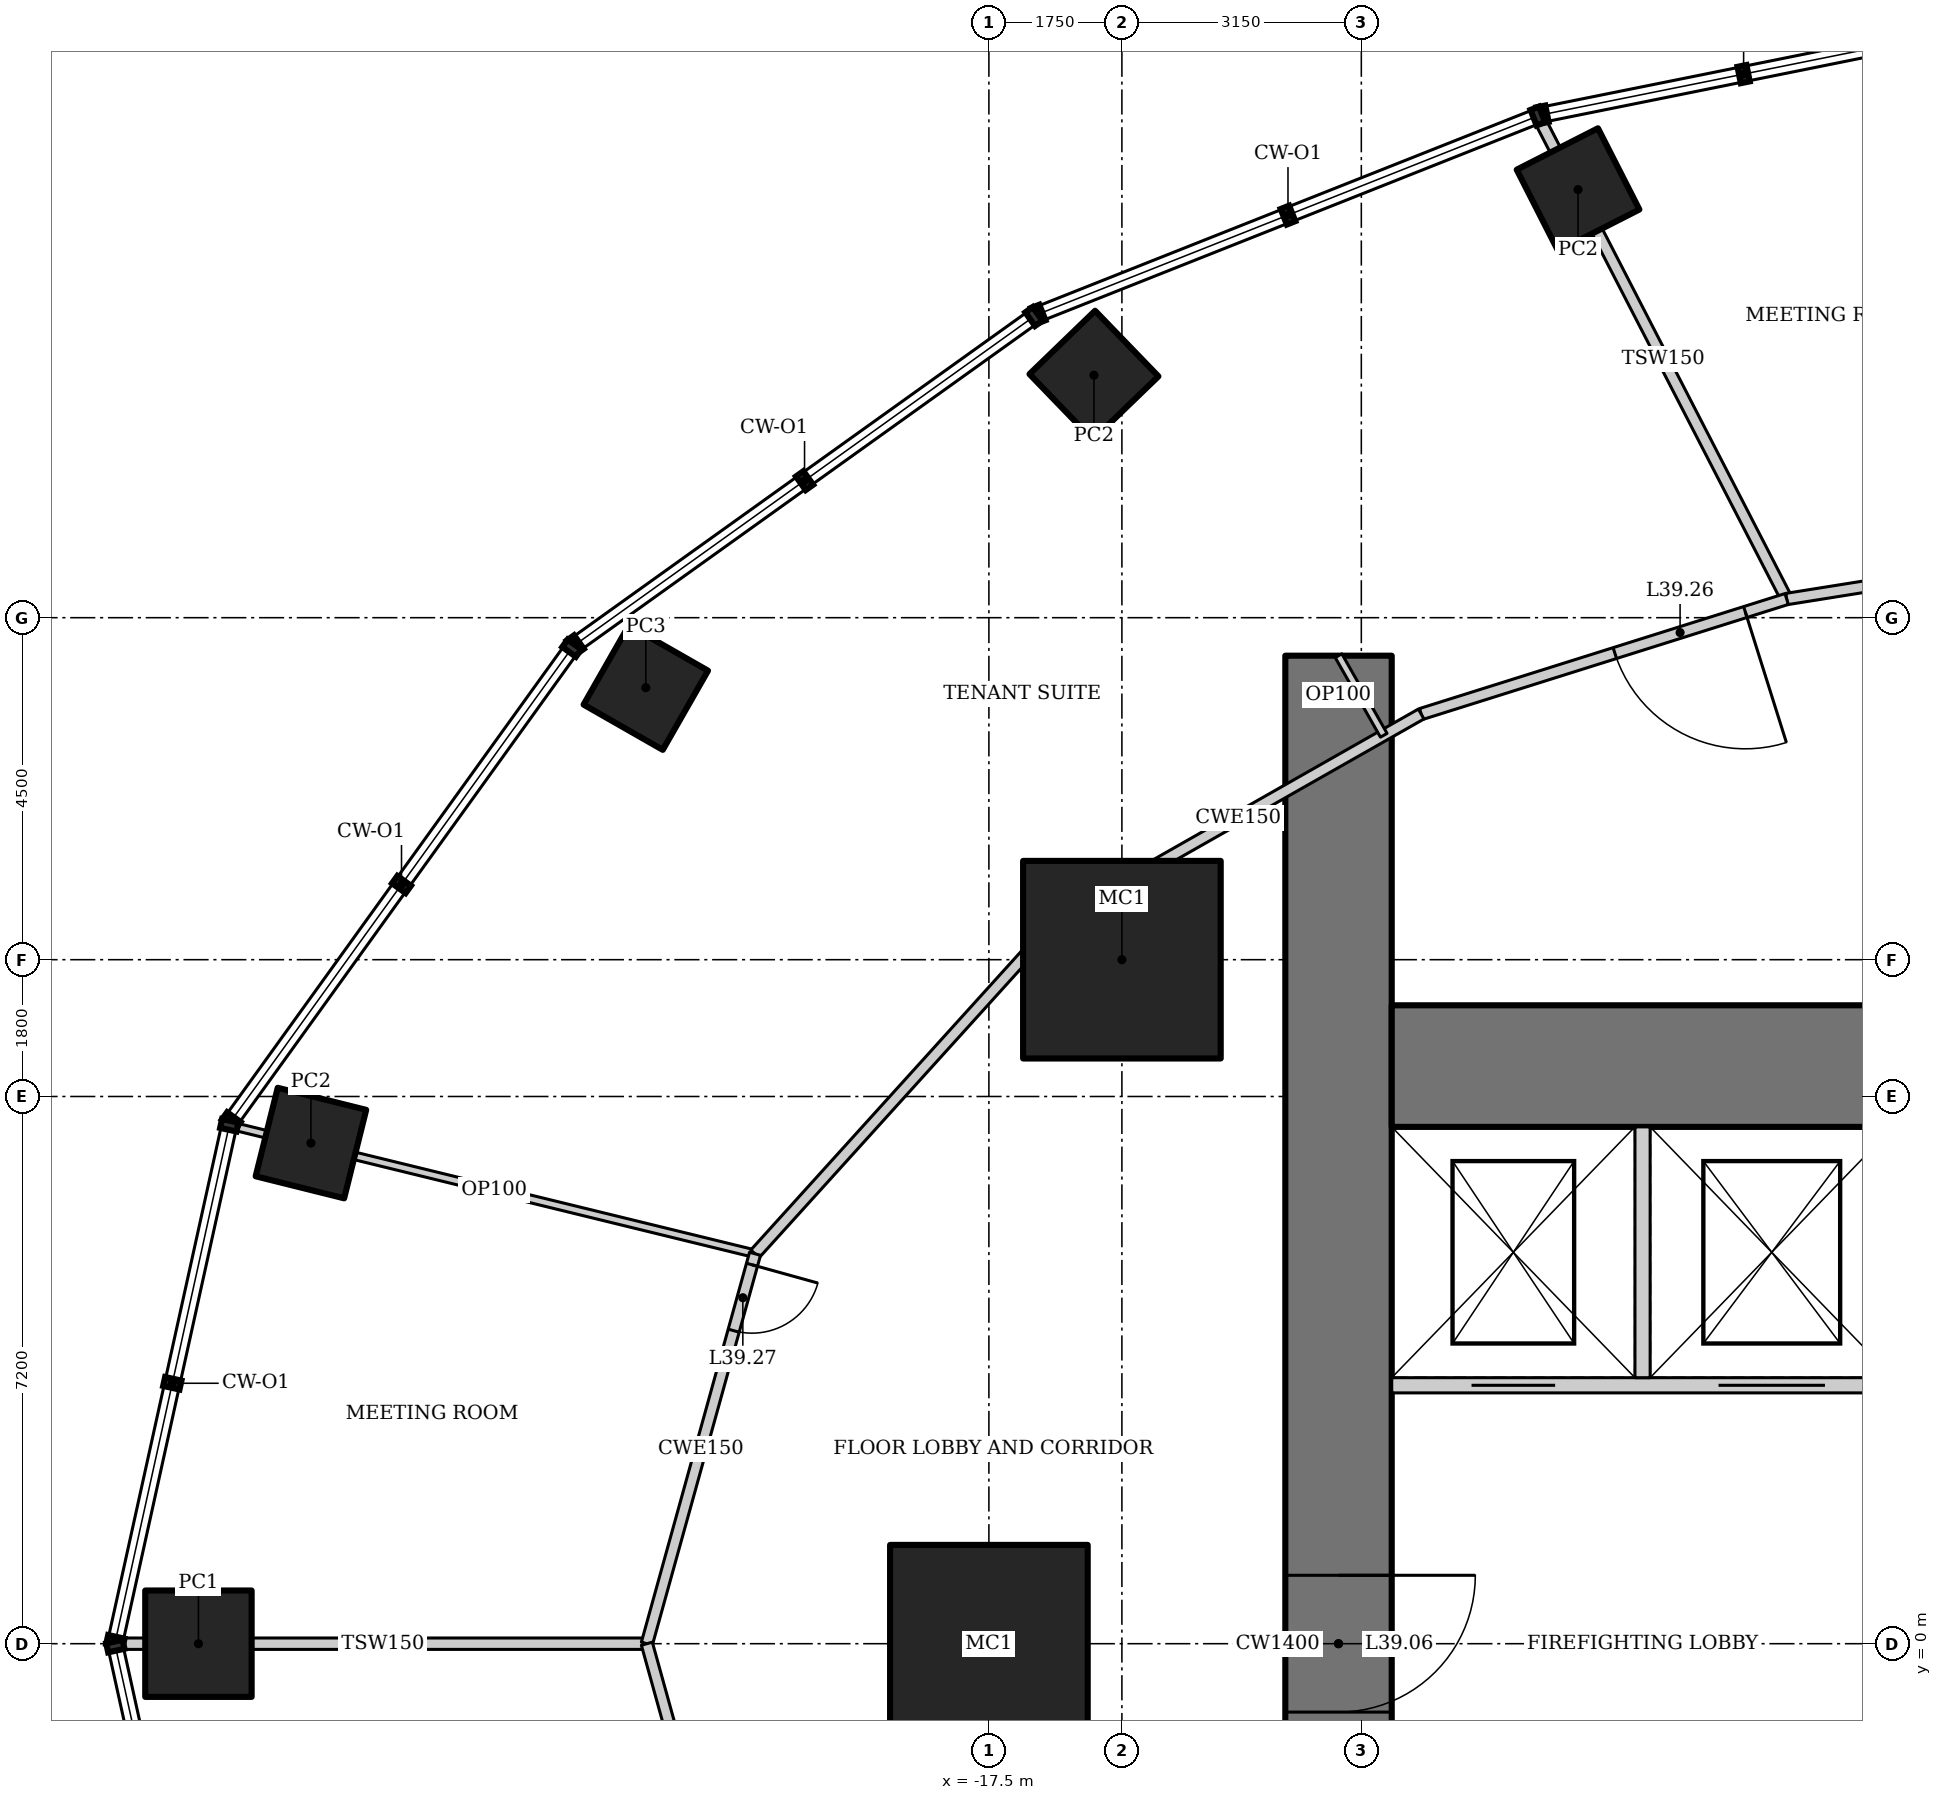
"""IFC4 building model, lengths in metres.
Left out: names, types, materials, properties, quantities, classifications, styles, units other than length and angle.
Written with IfcOpenShell. Run it as: python <this file> out.ifc"""

import sys

from ifc_helpers import new_model, si_unit, direction, frame, frame_2d, origin, origin_2d, place, context, subcontext, project, spatial, rectangle, hollow_rectangle, extrude, element, fill, save


model = new_model("IFC4")
c1 = context("Model", 3, precision=1e-05, world=origin(), true_north=direction((0.0, 1.0)))
c2 = subcontext(c1, "Body", "Model", "MODEL_VIEW")
j1 = project(units=[si_unit("LENGTHUNIT", "METRE"), si_unit("PLANEANGLEUNIT", "RADIAN")], contexts=[c1])
p1 = place(None, origin())
s1 = spatial("IfcSite", under=j1, at=p1, CompositionType="ELEMENT")
p2 = place(p1, origin())
s2 = spatial("IfcBuilding", under=s1, at=p2, CompositionType="ELEMENT")
p3 = place(p2, frame((0.0, 0.0, 167.8)))
s3 = spatial("IfcBuildingStorey", under=s2, at=p3, CompositionType="ELEMENT", Elevation=167.8)
for number, where, z_axis, x_axis in (
    (1, (-15.75, 9.0, 0.0), (0.0, 0.0, 1.0), (1.0, 0.0, 0.0)),
    (2, (-17.5, 0.0, 0.0), (0.0, 0.0, 1.0), (1.0, 0.0, 0.0)),
):
    element("IfcColumn", number, at=place(p3, frame(where, z_axis=z_axis, x_axis=x_axis)), inside=s3, PredefinedType="COLUMN", context=c2, shape_type="SweptSolid", body=[
        extrude(hollow_rectangle(XDim=2.6, YDim=2.6, WallThickness=0.13, at=origin_2d()), origin(), (0.0, 0.0, 1.0), 4.2),
    ])
for number, where, z_axis, x_axis in (
    (3, (-9.749, 19.133, 0.0), (0.0, 0.0, 1.0), (0.891, 0.454, 0.0)),
    (4, (-16.118, 16.69, 0.0), (0.0, 0.0, 1.0), (0.719, 0.695, 0.0)),
):
    element("IfcColumn", number, at=place(p3, frame(where, z_axis=z_axis, x_axis=x_axis)), inside=s3, PredefinedType="COLUMN", context=c2, shape_type="SweptSolid", body=[
        extrude(hollow_rectangle(XDim=1.2, YDim=1.2, WallThickness=0.1, at=origin_2d()), origin(), (0.0, 0.0, 1.0), 4.2),
    ])
p4 = place(p3, frame((-22.014, 12.579, 0.0), z_axis=(0.0, 0.0, 1.0), x_axis=(0.496139221777, 0.86824298017, 0.0)))
e5 = element("IfcColumn", 5, at=p4, inside=s3, PredefinedType="COLUMN", context=c2, shape_type="SweptSolid", body=[
    extrude(hollow_rectangle(XDim=1.2, YDim=1.2, WallThickness=0.12, at=origin_2d()), origin(), (0.0, 0.0, 1.0), 4.2),
])
p5 = place(p3, frame((-26.42, 6.587, 0.0), z_axis=(0.0, 0.0, 1.0), x_axis=(0.2419218956, 0.970295726276, 0.0)))
e6 = element("IfcColumn", 6, at=p5, inside=s3, PredefinedType="COLUMN", context=c2, shape_type="SweptSolid", body=[
    extrude(hollow_rectangle(XDim=1.2, YDim=1.2, WallThickness=0.1, at=origin_2d()), origin(), (0.0, 0.0, 1.0), 4.2),
])
p6 = place(p3, frame((-27.9, 0.0, 0.0), z_axis=(0.0, 0.0, 1.0), x_axis=(1.0, 0.0, 0.0)))
e7 = element("IfcColumn", 7, at=p6, inside=s3, PredefinedType="COLUMN", context=c2, shape_type="SweptSolid", body=[
    extrude(hollow_rectangle(XDim=1.4, YDim=1.4, WallThickness=0.1, at=origin_2d()), origin(), (0.0, 0.0, 1.0), 4.2),
])
p7 = place(p3, frame((-12.9, 13.0, 0.0), z_axis=(0.0, 0.0, 1.0), x_axis=(0.0, -1.0, 0.0)))
e8 = element("IfcWall", 8, at=p7, inside=s3, PredefinedType="SHEAR", context=c2, shape_type="SweptSolid", body=[
    extrude(rectangle(XDim=26.0, YDim=1.4, at=frame_2d((13.0, 0.0))), origin(), (0.0, 0.0, 1.0), 4.2),
])
p8 = place(p7, frame((12.1, 0.0, 0.0)))
e9 = element("IfcOpeningElement", 9, at=p8, cuts=e8, PredefinedType="OPENING", context=c2, shape_type="SweptSolid", body=[
    extrude(rectangle(XDim=1.8, YDim=2.1, at=frame_2d((0.9, 1.05))), frame((0.0, 0.71, 0.0), z_axis=(0.0, -1.0, 0.0), x_axis=(1.0, 0.0, 0.0)), (0.0, 0.0, 1.0), 1.42),
])
p9 = place(p3, frame((12.2, 7.6, 0.0), z_axis=(0.0, 0.0, 1.0), x_axis=(-1.0, 0.0, 0.0)))
e10 = element("IfcWall", 10, at=p9, inside=s3, PredefinedType="SHEAR", context=c2, shape_type="SweptSolid", body=[
    extrude(rectangle(XDim=24.4, YDim=1.6, at=frame_2d((12.2, 0.0))), origin(), (0.0, 0.0, 1.0), 4.2),
])
p10 = place(p3, frame((-12.2, 3.4, 0.0), z_axis=(0.0, 0.0, 1.0), x_axis=(1.0, 0.0, 0.0)))
e11 = element("IfcWall", 11, at=p10, inside=s3, PredefinedType="SOLIDWALL", context=c2, shape_type="SweptSolid", body=[
    extrude(rectangle(XDim=6.6, YDim=0.2, at=frame_2d((3.3, 0.0))), origin(), (0.0, 0.0, 1.0), 4.2),
])
p11 = place(p10, frame((1.05, 0.0, 0.0)))
e12 = element("IfcOpeningElement", 12, at=p11, cuts=e11, PredefinedType="OPENING", context=c2, shape_type="SweptSolid", body=[
    extrude(rectangle(XDim=1.1, YDim=2.2, at=frame_2d((0.55, 1.1))), frame((0.0, 0.11, 0.0), z_axis=(0.0, -1.0, 0.0), x_axis=(1.0, 0.0, 0.0)), (0.0, 0.0, 1.0), 0.22),
])
p12 = place(p10, frame((4.3, 0.0, 0.0)))
e13 = element("IfcOpeningElement", 13, at=p12, cuts=e11, PredefinedType="OPENING", context=c2, shape_type="SweptSolid", body=[
    extrude(rectangle(XDim=1.4, YDim=2.2, at=frame_2d((0.7, 1.1))), frame((0.0, 0.11, 0.0), z_axis=(0.0, -1.0, 0.0), x_axis=(1.0, 0.0, 0.0)), (0.0, 0.0, 1.0), 0.22),
])
p13 = place(p3, frame((-8.9, 3.5, 0.0), z_axis=(0.0, 0.0, 1.0), x_axis=(0.0, 1.0, 0.0)))
e14 = element("IfcWall", 14, at=p13, inside=s3, PredefinedType="SOLIDWALL", context=c2, shape_type="SweptSolid", body=[
    extrude(rectangle(XDim=3.3, YDim=0.2, at=frame_2d((1.65, 0.0))), origin(), (0.0, 0.0, 1.0), 4.2),
])
p14 = place(p3, frame((-10.253, 20.052, 0.0), z_axis=(0.0, 0.0, 1.0), x_axis=(0.458082677592, -0.888909590729, 0.0)))
e15 = element("IfcWall", 15, at=p14, inside=s3, PredefinedType="PARTITIONING", context=c2, shape_type="SweptSolid", body=[
    extrude(rectangle(XDim=7.094, YDim=0.15, at=frame_2d((3.547, 0.0))), origin(), (0.0, 0.0, 1.0), 3.349),
])
p15 = place(p3, frame((-27.441, 6.809, 0.0), z_axis=(0.0, 0.0, 1.0), x_axis=(0.971377572955, -0.237540755996, 0.0)))
e16 = element("IfcWall", 16, at=p15, inside=s3, PredefinedType="PARTITIONING", context=c2, shape_type="SweptSolid", body=[
    extrude(rectangle(XDim=7.066, YDim=0.1, at=frame_2d((3.533, 0.0))), origin(), (0.0, 0.0, 1.0), 3.113),
])
p16 = place(p3, frame((-28.944, 0.0, 0.0), z_axis=(0.0, 0.0, 1.0), x_axis=(1.0, 0.0, 0.0)))
e17 = element("IfcWall", 17, at=p16, inside=s3, PredefinedType="PARTITIONING", context=c2, shape_type="SweptSolid", body=[
    extrude(rectangle(XDim=6.944, YDim=0.15, at=frame_2d((3.472, 0.0))), origin(), (0.0, 0.0, 1.0), 3.204),
])
p17 = place(p3, frame((-3.31, 14.335, 0.0), z_axis=(0.0, 0.0, 1.0), x_axis=(-0.987511396594, -0.157547585181, 0.0)))
e18 = element("IfcWall", 18, at=p17, inside=s3, PredefinedType="PARTITIONING", context=c2, shape_type="SweptSolid", body=[
    extrude(rectangle(XDim=3.741, YDim=0.15, at=frame_2d((1.87, 0.0))), origin(), (0.0, 0.0, 1.0), 4.05),
])
p18 = place(p17, frame((0.15, 0.0, 0.0)))
e19 = element("IfcOpeningElement", 19, at=p18, cuts=e18, PredefinedType="OPENING", context=c2, shape_type="SweptSolid", body=[
    extrude(rectangle(XDim=0.9, YDim=2.1, at=frame_2d((0.45, 1.05))), frame((0.0, 0.085, 0.0), z_axis=(0.0, -1.0, 0.0), x_axis=(1.0, 0.0, 0.0)), (0.0, 0.0, 1.0), 0.17),
])
p19 = place(p3, frame((-7.004, 13.746, 0.0), z_axis=(0.0, 0.0, 1.0), x_axis=(-0.953893934057, -0.300143903101, 0.0)))
e20 = element("IfcWall", 20, at=p19, inside=s3, PredefinedType="PARTITIONING", context=c2, shape_type="SweptSolid", body=[
    extrude(rectangle(XDim=5.042, YDim=0.15, at=frame_2d((2.521, 0.0))), origin(), (0.0, 0.0, 1.0), 4.05),
])
p20 = place(p19, frame((0.57, 0.0, 0.0)))
e21 = element("IfcOpeningElement", 21, at=p20, cuts=e20, PredefinedType="OPENING", context=c2, shape_type="SweptSolid", body=[
    extrude(rectangle(XDim=1.8, YDim=2.1, at=frame_2d((0.9, 1.05))), frame((0.0, 0.085, 0.0), z_axis=(0.0, -1.0, 0.0), x_axis=(1.0, 0.0, 0.0)), (0.0, 0.0, 1.0), 0.17),
])
p21 = place(p3, frame((-11.813, 12.232, 0.0), z_axis=(0.0, 0.0, 1.0), x_axis=(-0.869375991036, -0.494151177485, 0.0)))
e22 = element("IfcWall", 22, at=p21, inside=s3, PredefinedType="PARTITIONING", context=c2, shape_type="SweptSolid", body=[
    extrude(rectangle(XDim=5.532, YDim=0.15, at=frame_2d((2.766, 0.0))), origin(), (0.0, 0.0, 1.0), 4.05),
])
p22 = place(p3, frame((-16.623, 9.499, 0.0), z_axis=(0.0, 0.0, 1.0), x_axis=(-0.671118353743, -0.741350224435, 0.0)))
e23 = element("IfcWall", 23, at=p22, inside=s3, PredefinedType="PARTITIONING", context=c2, shape_type="SweptSolid", body=[
    extrude(rectangle(XDim=5.892, YDim=0.15, at=frame_2d((2.946, 0.0))), origin(), (0.0, 0.0, 1.0), 4.05),
])
p23 = place(p3, frame((-20.577, 5.13, 0.0), z_axis=(0.0, 0.0, 1.0), x_axis=(-0.267293817428, -0.963615076244, 0.0)))
e24 = element("IfcWall", 24, at=p23, inside=s3, PredefinedType="PARTITIONING", context=c2, shape_type="SweptSolid", body=[
    extrude(rectangle(XDim=5.324, YDim=0.15, at=frame_2d((2.662, 0.0))), origin(), (0.0, 0.0, 1.0), 4.05),
])
p24 = place(p23, frame((0.15, 0.0, 0.0)))
e25 = element("IfcOpeningElement", 25, at=p24, cuts=e24, PredefinedType="OPENING", context=c2, shape_type="SweptSolid", body=[
    extrude(rectangle(XDim=0.9, YDim=2.1, at=frame_2d((0.45, 1.05))), frame((0.0, 0.085, 0.0), z_axis=(0.0, -1.0, 0.0), x_axis=(1.0, 0.0, 0.0)), (0.0, 0.0, 1.0), 0.17),
])
p25 = place(p3, frame((-22.0, 0.0, 0.0), z_axis=(0.0, 0.0, 1.0), x_axis=(0.267293817428, -0.963615076244, 0.0)))
e26 = element("IfcWall", 26, at=p25, inside=s3, PredefinedType="PARTITIONING", context=c2, shape_type="SweptSolid", body=[
    extrude(rectangle(XDim=5.324, YDim=0.15, at=frame_2d((2.662, 0.0))), origin(), (0.0, 0.0, 1.0), 4.05),
])
p26 = place(p3, frame((-12.9, 13.0, 0.0), z_axis=(0.0, 0.0, 1.0), x_axis=(0.494173075358, -0.869363543974, 0.0)))
e27 = element("IfcWall", 27, at=p26, inside=s3, PredefinedType="PARTITIONING", context=c2, shape_type="SweptSolid", body=[
    extrude(rectangle(XDim=1.204, YDim=0.1, at=frame_2d((0.602, 0.0))), origin(), (0.0, 0.0, 1.0), 4.05),
])
p27 = place(p8, origin())
e28 = element("IfcDoor", 28, at=p27, inside=s3, OperationType="DOUBLE_DOOR_DOUBLE_SWING", PredefinedType="DOOR", context=c2, shape_type="SweptSolid", body=[
    extrude(rectangle(XDim=1.8, YDim=2.1, at=frame_2d((0.9, 1.05))), frame((0.0, 0.025, 0.0), z_axis=(0.0, -1.0, 0.0), x_axis=(1.0, 0.0, 0.0)), (0.0, 0.0, 1.0), 0.05),
])
fill(e9, e28)
p28 = place(p11, origin())
e29 = element("IfcDoor", 29, at=p28, inside=s3, OperationType="DOUBLE_DOOR_SLIDING", PredefinedType="DOOR", context=c2, shape_type="SweptSolid", body=[
    extrude(rectangle(XDim=1.1, YDim=2.2, at=frame_2d((0.55, 1.1))), frame((0.0, 0.025, 0.0), z_axis=(0.0, -1.0, 0.0), x_axis=(1.0, 0.0, 0.0)), (0.0, 0.0, 1.0), 0.05),
])
fill(e12, e29)
p29 = place(p12, origin())
e30 = element("IfcDoor", 30, at=p29, inside=s3, OperationType="DOUBLE_DOOR_SLIDING", PredefinedType="DOOR", context=c2, shape_type="SweptSolid", body=[
    extrude(rectangle(XDim=1.4, YDim=2.2, at=frame_2d((0.7, 1.1))), frame((0.0, 0.025, 0.0), z_axis=(0.0, -1.0, 0.0), x_axis=(1.0, 0.0, 0.0)), (0.0, 0.0, 1.0), 0.05),
])
fill(e13, e30)
p30 = place(p20, origin())
e31 = element("IfcDoor", 31, at=p30, inside=s3, OperationType="DOUBLE_DOOR_DOUBLE_SWING", PredefinedType="DOOR", context=c2, shape_type="SweptSolid", body=[
    extrude(rectangle(XDim=1.8, YDim=2.1, at=frame_2d((0.9, 1.05))), frame((0.0, 0.025, 0.0), z_axis=(0.0, -1.0, 0.0), x_axis=(1.0, 0.0, 0.0)), (0.0, 0.0, 1.0), 0.05),
])
fill(e21, e31)
p31 = place(p24, origin())
e32 = element("IfcDoor", 32, at=p31, inside=s3, OperationType="SINGLE_SWING_LEFT", PredefinedType="DOOR", context=c2, shape_type="SweptSolid", body=[
    extrude(rectangle(XDim=0.9, YDim=2.1, at=frame_2d((0.45, 1.05))), frame((0.0, 0.025, 0.0), z_axis=(0.0, -1.0, 0.0), x_axis=(1.0, 0.0, 0.0)), (0.0, 0.0, 1.0), 0.05),
])
fill(e25, e32)
save(model, sys.argv[1])
